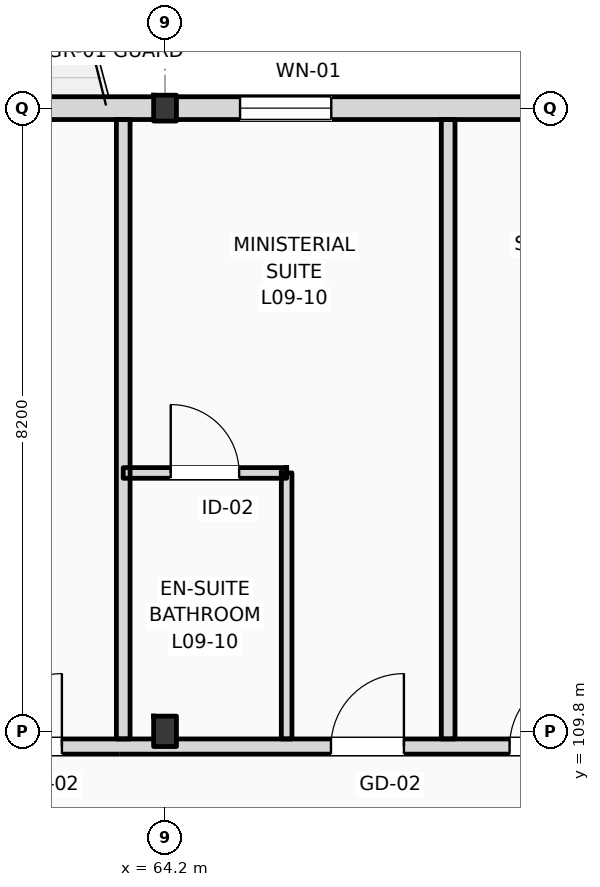
"""IFC4 building model, lengths in metres.
Left out: names, types, materials, properties, quantities, classifications, styles, units other than length and angle.
Written with IfcOpenShell. Run it as: python <this file> out.ifc"""

import sys

from ifc_helpers import new_model, si_unit, direction, frame, frame_2d, origin, origin_2d, place, context, subcontext, project, spatial, rectangle, i_section, extrude, element, fill, save


model = new_model("IFC4")
c1 = context("Model", 3, precision=1e-05, world=origin(), true_north=direction((0.0, 1.0)))
c2 = subcontext(c1, "Body", "Model", "MODEL_VIEW")
j1 = project(units=[si_unit("LENGTHUNIT", "METRE"), si_unit("PLANEANGLEUNIT", "RADIAN")], contexts=[c1])
p1 = place(None, origin())
s1 = spatial("IfcSite", under=j1, at=p1, CompositionType="ELEMENT")
p2 = place(p1, origin())
s2 = spatial("IfcBuilding", under=s1, at=p2, CompositionType="ELEMENT")
p3 = place(p2, frame((0.0, 0.0, 39.0)))
s3 = spatial("IfcBuildingStorey", under=s2, at=p3, CompositionType="ELEMENT", Elevation=39.0)
p4 = place(p3, frame((64.2, 109.8, 0.0), z_axis=(0.0, 0.0, 1.0), x_axis=(1.0, 0.0, 0.0)))
e1 = element("IfcColumn", 1, at=p4, inside=s3, PredefinedType="COLUMN", context=c2, shape_type="SweptSolid", body=[
    extrude(i_section(OverallWidth=0.3, OverallDepth=0.4, WebThickness=0.013, FlangeThickness=0.024, FilletRadius=0.027, at=origin_2d()), origin(), (0.0, 0.0, 1.0), 3.6),
])
p5 = place(p3, frame((64.2, 118.0, 0.0), z_axis=(0.0, 0.0, 1.0), x_axis=(1.0, 0.0, 0.0)))
e2 = element("IfcColumn", 2, at=p5, inside=s3, PredefinedType="COLUMN", context=c2, shape_type="SweptSolid", body=[
    extrude(i_section(OverallWidth=0.3, OverallDepth=0.34, WebThickness=0.012, FlangeThickness=0.021, FilletRadius=0.027, at=origin_2d()), origin(), (0.0, 0.0, 1.0), 3.6),
])
p6 = place(p3, frame((22.5, 118.0, 0.0), z_axis=(0.0, 0.0, 1.0), x_axis=(1.0, 0.0, 0.0)))
e3 = element("IfcWall", 3, at=p6, inside=s3, PredefinedType="STANDARD", context=c2, shape_type="SweptSolid", body=[
    extrude(rectangle(XDim=72.9, YDim=0.3, at=frame_2d((36.45, 0.0))), origin(), (0.0, 0.0, 1.0), 2.92),
])
p7 = place(p6, frame((3.6, 0.0, 0.9)))
e4 = element("IfcOpeningElement", 4, at=p7, cuts=e3, PredefinedType="OPENING", context=c2, shape_type="SweptSolid", body=[
    extrude(rectangle(XDim=1.1, YDim=1.6, at=frame_2d((0.55, 0.8))), frame((0.0, 0.16, 0.0), z_axis=(0.0, -1.0, 0.0), x_axis=(1.0, 0.0, 0.0)), (0.0, 0.0, 1.0), 0.32),
])
p8 = place(p6, frame((6.688, 0.0, 0.0)))
e5 = element("IfcOpeningElement", 5, at=p8, cuts=e3, PredefinedType="OPENING", context=c2, shape_type="SweptSolid", body=[
    extrude(rectangle(XDim=1.2, YDim=2.25, at=frame_2d((0.6, 1.125))), frame((0.0, 0.16, 0.0), z_axis=(0.0, -1.0, 0.0), x_axis=(1.0, 0.0, 0.0)), (0.0, 0.0, 1.0), 0.32),
])
p9 = place(p6, frame((11.388, 0.0, 0.9)))
e6 = element("IfcOpeningElement", 6, at=p9, cuts=e3, PredefinedType="OPENING", context=c2, shape_type="SweptSolid", body=[
    extrude(rectangle(XDim=1.6, YDim=1.75, at=frame_2d((0.8, 0.875))), frame((0.0, 0.16, 0.0), z_axis=(0.0, -1.0, 0.0), x_axis=(1.0, 0.0, 0.0)), (0.0, 0.0, 1.0), 0.32),
])
p10 = place(p6, frame((15.413, 0.0, 0.9)))
e7 = element("IfcOpeningElement", 7, at=p10, cuts=e3, PredefinedType="OPENING", context=c2, shape_type="SweptSolid", body=[
    extrude(rectangle(XDim=1.75, YDim=1.84, at=frame_2d((0.875, 0.92))), frame((0.0, 0.16, 0.0), z_axis=(0.0, -1.0, 0.0), x_axis=(1.0, 0.0, 0.0)), (0.0, 0.0, 1.0), 0.32),
])
p11 = place(p6, frame((21.245, 0.0, 0.0)))
e8 = element("IfcOpeningElement", 8, at=p11, cuts=e3, PredefinedType="OPENING", context=c2, shape_type="SweptSolid", body=[
    extrude(rectangle(XDim=1.2, YDim=2.25, at=frame_2d((0.6, 1.125))), frame((0.0, 0.16, 0.0), z_axis=(0.0, -1.0, 0.0), x_axis=(1.0, 0.0, 0.0)), (0.0, 0.0, 1.0), 0.32),
])
p12 = place(p6, frame((23.705, 0.0, 0.0)))
e9 = element("IfcOpeningElement", 9, at=p12, cuts=e3, PredefinedType="OPENING", context=c2, shape_type="SweptSolid", body=[
    extrude(rectangle(XDim=1.2, YDim=2.25, at=frame_2d((0.6, 1.125))), frame((0.0, 0.16, 0.0), z_axis=(0.0, -1.0, 0.0), x_axis=(1.0, 0.0, 0.0)), (0.0, 0.0, 1.0), 0.32),
])
p13 = place(p6, frame((28.488, 0.0, 0.9)))
e10 = element("IfcOpeningElement", 10, at=p13, cuts=e3, PredefinedType="OPENING", context=c2, shape_type="SweptSolid", body=[
    extrude(rectangle(XDim=2.6, YDim=1.84, at=frame_2d((1.3, 0.92))), frame((0.0, 0.16, 0.0), z_axis=(0.0, -1.0, 0.0), x_axis=(1.0, 0.0, 0.0)), (0.0, 0.0, 1.0), 0.32),
])
p14 = place(p6, frame((34.76, 0.0, 0.9)))
e11 = element("IfcOpeningElement", 11, at=p14, cuts=e3, PredefinedType="OPENING", context=c2, shape_type="SweptSolid", body=[
    extrude(rectangle(XDim=1.1, YDim=1.84, at=frame_2d((0.55, 0.92))), frame((0.0, 0.16, 0.0), z_axis=(0.0, -1.0, 0.0), x_axis=(1.0, 0.0, 0.0)), (0.0, 0.0, 1.0), 0.32),
])
p15 = place(p6, frame((38.143, 0.0, 0.0)))
e12 = element("IfcOpeningElement", 12, at=p15, cuts=e3, PredefinedType="OPENING", context=c2, shape_type="SweptSolid", body=[
    extrude(rectangle(XDim=1.2, YDim=2.25, at=frame_2d((0.6, 1.125))), frame((0.0, 0.16, 0.0), z_axis=(0.0, -1.0, 0.0), x_axis=(1.0, 0.0, 0.0)), (0.0, 0.0, 1.0), 0.32),
])
p16 = place(p6, frame((42.687, 0.0, 0.9)))
e13 = element("IfcOpeningElement", 13, at=p16, cuts=e3, PredefinedType="OPENING", context=c2, shape_type="SweptSolid", body=[
    extrude(rectangle(XDim=1.2, YDim=1.8, at=frame_2d((0.6, 0.9))), frame((0.0, 0.16, 0.0), z_axis=(0.0, -1.0, 0.0), x_axis=(1.0, 0.0, 0.0)), (0.0, 0.0, 1.0), 0.32),
])
p17 = place(p6, frame((47.112, 0.0, 0.9)))
e14 = element("IfcOpeningElement", 14, at=p17, cuts=e3, PredefinedType="OPENING", context=c2, shape_type="SweptSolid", body=[
    extrude(rectangle(XDim=1.35, YDim=1.84, at=frame_2d((0.675, 0.92))), frame((0.0, 0.16, 0.0), z_axis=(0.0, -1.0, 0.0), x_axis=(1.0, 0.0, 0.0)), (0.0, 0.0, 1.0), 0.32),
])
p18 = place(p6, frame((52.482, 0.0, 0.0)))
e15 = element("IfcOpeningElement", 15, at=p18, cuts=e3, PredefinedType="OPENING", context=c2, shape_type="SweptSolid", body=[
    extrude(rectangle(XDim=1.2, YDim=2.25, at=frame_2d((0.6, 1.125))), frame((0.0, 0.16, 0.0), z_axis=(0.0, -1.0, 0.0), x_axis=(1.0, 0.0, 0.0)), (0.0, 0.0, 1.0), 0.32),
])
p19 = place(p6, frame((54.942, 0.0, 0.0)))
e16 = element("IfcOpeningElement", 16, at=p19, cuts=e3, PredefinedType="OPENING", context=c2, shape_type="SweptSolid", body=[
    extrude(rectangle(XDim=1.2, YDim=2.25, at=frame_2d((0.6, 1.125))), frame((0.0, 0.16, 0.0), z_axis=(0.0, -1.0, 0.0), x_axis=(1.0, 0.0, 0.0)), (0.0, 0.0, 1.0), 0.32),
])
p20 = place(p6, frame((60.387, 0.0, 0.9)))
e17 = element("IfcOpeningElement", 17, at=p20, cuts=e3, PredefinedType="OPENING", context=c2, shape_type="SweptSolid", body=[
    extrude(rectangle(XDim=1.8, YDim=1.84, at=frame_2d((0.9, 0.92))), frame((0.0, 0.16, 0.0), z_axis=(0.0, -1.0, 0.0), x_axis=(1.0, 0.0, 0.0)), (0.0, 0.0, 1.0), 0.32),
])
p21 = place(p6, frame((66.013, 0.0, 0.9)))
e18 = element("IfcOpeningElement", 18, at=p21, cuts=e3, PredefinedType="OPENING", context=c2, shape_type="SweptSolid", body=[
    extrude(rectangle(XDim=1.35, YDim=1.84, at=frame_2d((0.675, 0.92))), frame((0.0, 0.16, 0.0), z_axis=(0.0, -1.0, 0.0), x_axis=(1.0, 0.0, 0.0)), (0.0, 0.0, 1.0), 0.32),
])
p22 = place(p6, frame((69.275, 0.0, 0.9)))
e19 = element("IfcOpeningElement", 19, at=p22, cuts=e3, PredefinedType="OPENING", context=c2, shape_type="SweptSolid", body=[
    extrude(rectangle(XDim=2.1, YDim=1.84, at=frame_2d((1.05, 0.92))), frame((0.0, 0.16, 0.0), z_axis=(0.0, -1.0, 0.0), x_axis=(1.0, 0.0, 0.0)), (0.0, 0.0, 1.0), 0.32),
])
p23 = place(p3, frame((10.65, 109.6, 0.0), z_axis=(0.0, 0.0, 1.0), x_axis=(1.0, 0.0, 0.0)))
e20 = element("IfcWall", 20, at=p23, inside=s3, PredefinedType="PARTITIONING", context=c2, shape_type="SweptSolid", body=[
    extrude(rectangle(XDim=84.61, YDim=0.2, at=frame_2d((42.305, 0.0))), origin(), (0.0, 0.0, 1.0), 2.82),
])
p24 = place(p23, frame((15.49, 0.0, 0.0)))
e21 = element("IfcOpeningElement", 21, at=p24, cuts=e20, PredefinedType="OPENING", context=c2, shape_type="SweptSolid", body=[
    extrude(rectangle(XDim=1.02, YDim=2.2, at=frame_2d((0.51, 1.1))), frame((0.0, 0.11, 0.0), z_axis=(0.0, -1.0, 0.0), x_axis=(1.0, 0.0, 0.0)), (0.0, 0.0, 1.0), 0.22),
])
p25 = place(p23, frame((19.703, 0.0, 0.0)))
e22 = element("IfcOpeningElement", 22, at=p25, cuts=e20, PredefinedType="OPENING", context=c2, shape_type="SweptSolid", body=[
    extrude(rectangle(XDim=1.02, YDim=2.2, at=frame_2d((0.51, 1.1))), frame((0.0, 0.11, 0.0), z_axis=(0.0, -1.0, 0.0), x_axis=(1.0, 0.0, 0.0)), (0.0, 0.0, 1.0), 0.22),
])
p26 = place(p23, frame((24.203, 0.0, 0.0)))
e23 = element("IfcOpeningElement", 23, at=p26, cuts=e20, PredefinedType="OPENING", context=c2, shape_type="SweptSolid", body=[
    extrude(rectangle(XDim=1.02, YDim=2.2, at=frame_2d((0.51, 1.1))), frame((0.0, 0.11, 0.0), z_axis=(0.0, -1.0, 0.0), x_axis=(1.0, 0.0, 0.0)), (0.0, 0.0, 1.0), 0.22),
])
p27 = place(p23, frame((26.552, 0.0, 0.0)))
e24 = element("IfcOpeningElement", 24, at=p27, cuts=e20, PredefinedType="OPENING", context=c2, shape_type="SweptSolid", body=[
    extrude(rectangle(XDim=1.02, YDim=2.2, at=frame_2d((0.51, 1.1))), frame((0.0, 0.11, 0.0), z_axis=(0.0, -1.0, 0.0), x_axis=(1.0, 0.0, 0.0)), (0.0, 0.0, 1.0), 0.22),
])
p28 = place(p23, frame((33.233, 0.0, 0.0)))
e25 = element("IfcOpeningElement", 25, at=p28, cuts=e20, PredefinedType="OPENING", context=c2, shape_type="SweptSolid", body=[
    extrude(rectangle(XDim=0.96, YDim=2.2, at=frame_2d((0.48, 1.1))), frame((0.0, 0.11, 0.0), z_axis=(0.0, -1.0, 0.0), x_axis=(1.0, 0.0, 0.0)), (0.0, 0.0, 1.0), 0.22),
])
p29 = place(p23, frame((35.583, 0.0, 0.0)))
e26 = element("IfcOpeningElement", 26, at=p29, cuts=e20, PredefinedType="OPENING", context=c2, shape_type="SweptSolid", body=[
    extrude(rectangle(XDim=0.96, YDim=2.2, at=frame_2d((0.48, 1.1))), frame((0.0, 0.11, 0.0), z_axis=(0.0, -1.0, 0.0), x_axis=(1.0, 0.0, 0.0)), (0.0, 0.0, 1.0), 0.22),
])
p30 = place(p23, frame((42.233, 0.0, 0.0)))
e27 = element("IfcOpeningElement", 27, at=p30, cuts=e20, PredefinedType="OPENING", context=c2, shape_type="SweptSolid", body=[
    extrude(rectangle(XDim=0.96, YDim=2.2, at=frame_2d((0.48, 1.1))), frame((0.0, 0.11, 0.0), z_axis=(0.0, -1.0, 0.0), x_axis=(1.0, 0.0, 0.0)), (0.0, 0.0, 1.0), 0.22),
])
p31 = place(p23, frame((46.983, 0.0, 0.0)))
e28 = element("IfcOpeningElement", 28, at=p31, cuts=e20, PredefinedType="OPENING", context=c2, shape_type="SweptSolid", body=[
    extrude(rectangle(XDim=0.96, YDim=2.2, at=frame_2d((0.48, 1.1))), frame((0.0, 0.11, 0.0), z_axis=(0.0, -1.0, 0.0), x_axis=(1.0, 0.0, 0.0)), (0.0, 0.0, 1.0), 0.22),
])
p32 = place(p23, frame((51.233, 0.0, 0.0)))
e29 = element("IfcOpeningElement", 29, at=p32, cuts=e20, PredefinedType="OPENING", context=c2, shape_type="SweptSolid", body=[
    extrude(rectangle(XDim=0.96, YDim=2.2, at=frame_2d((0.48, 1.1))), frame((0.0, 0.11, 0.0), z_axis=(0.0, -1.0, 0.0), x_axis=(1.0, 0.0, 0.0)), (0.0, 0.0, 1.0), 0.22),
])
p33 = place(p23, frame((55.733, 0.0, 0.0)))
e30 = element("IfcOpeningElement", 30, at=p33, cuts=e20, PredefinedType="OPENING", context=c2, shape_type="SweptSolid", body=[
    extrude(rectangle(XDim=0.96, YDim=2.2, at=frame_2d((0.48, 1.1))), frame((0.0, 0.11, 0.0), z_axis=(0.0, -1.0, 0.0), x_axis=(1.0, 0.0, 0.0)), (0.0, 0.0, 1.0), 0.22),
])
p34 = place(p23, frame((58.083, 0.0, 0.0)))
e31 = element("IfcOpeningElement", 31, at=p34, cuts=e20, PredefinedType="OPENING", context=c2, shape_type="SweptSolid", body=[
    extrude(rectangle(XDim=0.96, YDim=2.2, at=frame_2d((0.48, 1.1))), frame((0.0, 0.11, 0.0), z_axis=(0.0, -1.0, 0.0), x_axis=(1.0, 0.0, 0.0)), (0.0, 0.0, 1.0), 0.22),
])
p35 = place(p23, frame((64.732, 0.0, 0.0)))
e32 = element("IfcOpeningElement", 32, at=p35, cuts=e20, PredefinedType="OPENING", context=c2, shape_type="SweptSolid", body=[
    extrude(rectangle(XDim=0.96, YDim=2.2, at=frame_2d((0.48, 1.1))), frame((0.0, 0.11, 0.0), z_axis=(0.0, -1.0, 0.0), x_axis=(1.0, 0.0, 0.0)), (0.0, 0.0, 1.0), 0.22),
])
p36 = place(p23, frame((66.832, 0.0, 0.0)))
e33 = element("IfcOpeningElement", 33, at=p36, cuts=e20, PredefinedType="OPENING", context=c2, shape_type="SweptSolid", body=[
    extrude(rectangle(XDim=0.96, YDim=2.2, at=frame_2d((0.48, 1.1))), frame((0.0, 0.11, 0.0), z_axis=(0.0, -1.0, 0.0), x_axis=(1.0, 0.0, 0.0)), (0.0, 0.0, 1.0), 0.22),
])
p37 = place(p23, frame((73.732, 0.0, 0.0)))
e34 = element("IfcOpeningElement", 34, at=p37, cuts=e20, PredefinedType="OPENING", context=c2, shape_type="SweptSolid", body=[
    extrude(rectangle(XDim=0.96, YDim=2.2, at=frame_2d((0.48, 1.1))), frame((0.0, 0.11, 0.0), z_axis=(0.0, -1.0, 0.0), x_axis=(1.0, 0.0, 0.0)), (0.0, 0.0, 1.0), 0.22),
])
p38 = place(p23, frame((78.233, 0.0, 0.0)))
e35 = element("IfcOpeningElement", 35, at=p38, cuts=e20, PredefinedType="OPENING", context=c2, shape_type="SweptSolid", body=[
    extrude(rectangle(XDim=0.96, YDim=2.2, at=frame_2d((0.48, 1.1))), frame((0.0, 0.11, 0.0), z_axis=(0.0, -1.0, 0.0), x_axis=(1.0, 0.0, 0.0)), (0.0, 0.0, 1.0), 0.22),
])
p39 = place(p23, frame((80.62, 0.0, 0.0)))
e36 = element("IfcOpeningElement", 36, at=p39, cuts=e20, PredefinedType="OPENING", context=c2, shape_type="SweptSolid", body=[
    extrude(rectangle(XDim=0.96, YDim=2.2, at=frame_2d((0.48, 1.1))), frame((0.0, 0.11, 0.0), z_axis=(0.0, -1.0, 0.0), x_axis=(1.0, 0.0, 0.0)), (0.0, 0.0, 1.0), 0.22),
])
p40 = place(p23, frame((2.716, 0.0, 0.0)))
e37 = element("IfcOpeningElement", 37, at=p40, cuts=e20, PredefinedType="OPENING", context=c2, shape_type="SweptSolid", body=[
    extrude(rectangle(XDim=1.35, YDim=2.25, at=frame_2d((0.675, 1.125))), frame((0.0, 0.11, 0.0), z_axis=(0.0, -1.0, 0.0), x_axis=(1.0, 0.0, 0.0)), (0.0, 0.0, 1.0), 0.22),
])
p41 = place(p23, frame((6.65, 0.0, 0.0)))
e38 = element("IfcOpeningElement", 38, at=p41, cuts=e20, PredefinedType="OPENING", context=c2, shape_type="SweptSolid", body=[
    extrude(rectangle(XDim=1.35, YDim=2.25, at=frame_2d((0.675, 1.125))), frame((0.0, 0.11, 0.0), z_axis=(0.0, -1.0, 0.0), x_axis=(1.0, 0.0, 0.0)), (0.0, 0.0, 1.0), 0.22),
])
p42 = place(p23, frame((10.583, 0.0, 0.0)))
e39 = element("IfcOpeningElement", 39, at=p42, cuts=e20, PredefinedType="OPENING", context=c2, shape_type="SweptSolid", body=[
    extrude(rectangle(XDim=1.35, YDim=2.25, at=frame_2d((0.675, 1.125))), frame((0.0, 0.11, 0.0), z_axis=(0.0, -1.0, 0.0), x_axis=(1.0, 0.0, 0.0)), (0.0, 0.0, 1.0), 0.22),
])
for number, where, z_axis, x_axis in (
    (40, (63.65, 109.7, 0.0), (0.0, 0.0, 1.0), (0.0, 1.0, 0.0)),
    (41, (67.925, 109.7, 0.0), (0.0, 0.0, 1.0), (0.0, 1.0, 0.0)),
):
    element("IfcWall", number, at=place(p3, frame(where, z_axis=z_axis, x_axis=x_axis)), inside=s3, PredefinedType="PARTITIONING", context=c2, shape_type="SweptSolid", body=[
        extrude(rectangle(XDim=8.15, YDim=0.18, at=frame_2d((4.075, 0.0))), origin(), (0.0, 0.0, 1.0), 3.38),
    ])
p43 = place(p3, frame((65.8, 109.7, 0.0), z_axis=(0.0, 0.0, 1.0), x_axis=(0.0, 1.0, 0.0)))
e42 = element("IfcWall", 42, at=p43, inside=s3, PredefinedType="PARTITIONING", context=c2, shape_type="SweptSolid", body=[
    extrude(rectangle(XDim=3.5, YDim=0.14, at=frame_2d((1.75, 0.0))), origin(), (0.0, 0.0, 1.0), 3.38),
])
p44 = place(p3, frame((63.65, 113.2, 0.0), z_axis=(0.0, 0.0, 1.0), x_axis=(1.0, 0.0, 0.0)))
e43 = element("IfcWall", 43, at=p44, inside=s3, PredefinedType="PARTITIONING", context=c2, shape_type="SweptSolid", body=[
    extrude(rectangle(XDim=2.15, YDim=0.14, at=frame_2d((1.075, 0.0))), origin(), (0.0, 0.0, 1.0), 3.38),
])
p45 = place(p44, frame((0.625, 0.0, 0.0)))
e44 = element("IfcOpeningElement", 44, at=p45, cuts=e43, PredefinedType="OPENING", context=c2, shape_type="SweptSolid", body=[
    extrude(rectangle(XDim=0.9, YDim=2.1, at=frame_2d((0.45, 1.05))), frame((0.0, 0.08, 0.0), z_axis=(0.0, -1.0, 0.0), x_axis=(1.0, 0.0, 0.0)), (0.0, 0.0, 1.0), 0.16),
])
p46 = place(p16, origin())
e45 = element("IfcWindow", 45, at=p46, inside=s3, PartitioningType="DOUBLE_PANEL_VERTICAL", PredefinedType="WINDOW", context=c2, shape_type="SweptSolid", body=[
    extrude(rectangle(XDim=1.2, YDim=1.8, at=frame_2d((0.6, 0.9))), frame((0.0, 0.03, 0.0), z_axis=(0.0, -1.0, 0.0), x_axis=(1.0, 0.0, 0.0)), (0.0, 0.0, 1.0), 0.06),
])
fill(e13, e45)
p47 = place(p32, origin())
e46 = element("IfcDoor", 46, at=p47, inside=s3, OperationType="SINGLE_SWING_RIGHT", PredefinedType="DOOR", context=c2, shape_type="SweptSolid", body=[
    extrude(rectangle(XDim=0.96, YDim=2.2, at=frame_2d((0.48, 1.1))), frame((0.0, 0.025, 0.0), z_axis=(0.0, -1.0, 0.0), x_axis=(1.0, 0.0, 0.0)), (0.0, 0.0, 1.0), 0.05),
])
fill(e29, e46)
p48 = place(p33, origin())
e47 = element("IfcDoor", 47, at=p48, inside=s3, OperationType="SINGLE_SWING_RIGHT", PredefinedType="DOOR", context=c2, shape_type="SweptSolid", body=[
    extrude(rectangle(XDim=0.96, YDim=2.2, at=frame_2d((0.48, 1.1))), frame((0.0, 0.025, 0.0), z_axis=(0.0, -1.0, 0.0), x_axis=(1.0, 0.0, 0.0)), (0.0, 0.0, 1.0), 0.05),
])
fill(e30, e47)
p49 = place(p45, origin())
e48 = element("IfcDoor", 48, at=p49, inside=s3, OperationType="SINGLE_SWING_LEFT", PredefinedType="DOOR", context=c2, shape_type="SweptSolid", body=[
    extrude(rectangle(XDim=0.9, YDim=2.1, at=frame_2d((0.45, 1.05))), frame((0.0, 0.025, 0.0), z_axis=(0.0, -1.0, 0.0), x_axis=(1.0, 0.0, 0.0)), (0.0, 0.0, 1.0), 0.05),
])
fill(e44, e48)
p50 = place(p34, origin())
e49 = element("IfcDoor", 49, at=p50, inside=s3, OperationType="SINGLE_SWING_RIGHT", PredefinedType="DOOR", context=c2, shape_type="SweptSolid", body=[
    extrude(rectangle(XDim=0.96, YDim=2.2, at=frame_2d((0.48, 1.1))), frame((0.0, 0.025, 0.0), z_axis=(0.0, -1.0, 0.0), x_axis=(1.0, 0.0, 0.0)), (0.0, 0.0, 1.0), 0.05),
])
fill(e31, e49)
save(model, sys.argv[1])
